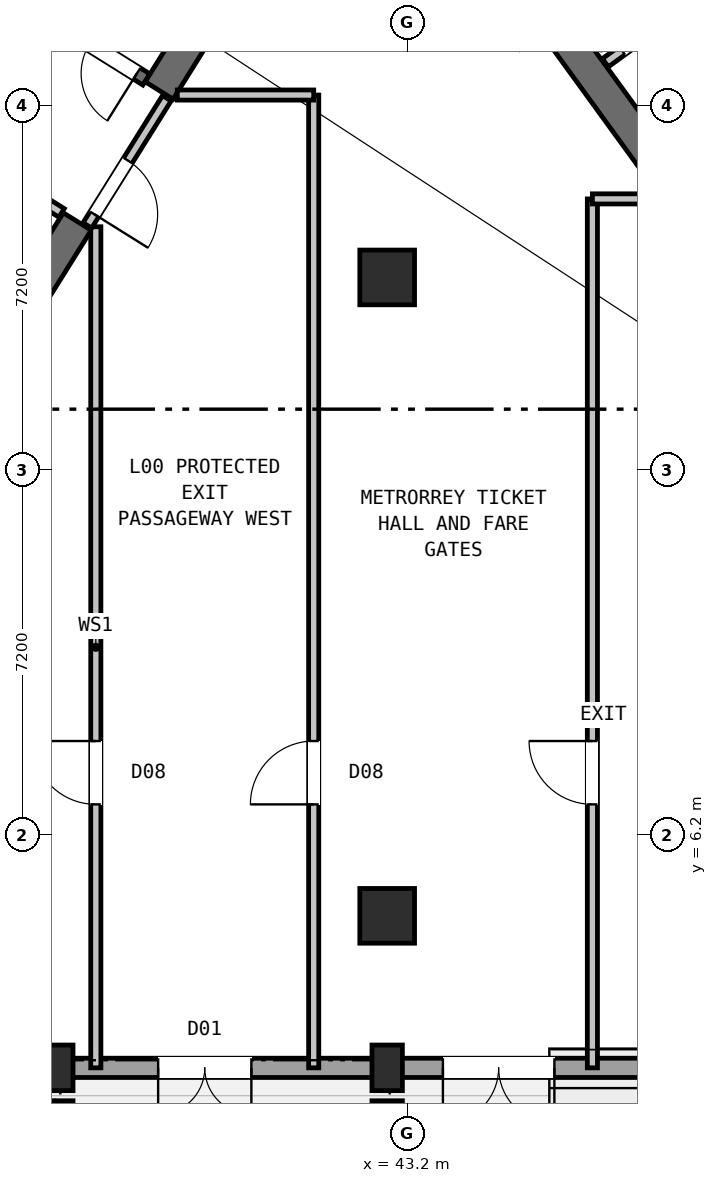
"""IFC4 building model, lengths in metres.
Left out: names, types, materials, properties, quantities, classifications, styles, units other than length and angle.
Written with IfcOpenShell. Run it as: python <this file> out.ifc"""

import sys

from ifc_helpers import new_model, si_unit, direction, frame, frame_2d, origin, origin_2d, place, context, subcontext, project, spatial, rectangle, hollow_rectangle, extrude, source, transform, mapped, element, fill, save


model = new_model("IFC4")
c1 = context("Model", 3, precision=1e-05, world=origin(), true_north=direction((0.0, 1.0)))
c2 = subcontext(c1, "Body", "Model", "MODEL_VIEW")
j1 = project(units=[si_unit("LENGTHUNIT", "METRE"), si_unit("PLANEANGLEUNIT", "RADIAN")], contexts=[c1])
p1 = place(None, origin())
s1 = spatial("IfcSite", under=j1, at=p1, CompositionType="ELEMENT")
p2 = place(p1, origin())
s2 = spatial("IfcBuilding", under=s1, at=p2, CompositionType="ELEMENT")
p3 = place(p2, origin())
s3 = spatial("IfcBuildingStorey", under=s2, at=p3, CompositionType="ELEMENT", Elevation=0.0)
p4 = place(p3, frame((40.168, 23.88, 0.0), z_axis=(0.0, 0.0, 1.0), x_axis=(-0.529893103397, -0.8480644427, 0.0)))
e1 = element("IfcWall", 1, at=p4, inside=s3, PredefinedType="SHEAR", context=c2, shape_type="SweptSolid", body=[
    extrude(rectangle(XDim=3.525, YDim=0.65, at=frame_2d((1.763, 0.0))), origin(), (0.0, 0.0, 1.0), 5.05),
])
p5 = place(p3, frame((36.683, 18.304, 0.0), z_axis=(0.0, 0.0, 1.0), x_axis=(-0.529899109053, -0.848060690178, 0.0)))
e2 = element("IfcWall", 2, at=p5, inside=s3, PredefinedType="SHEAR", context=c2, shape_type="SweptSolid", body=[
    extrude(rectangle(XDim=6.375, YDim=0.65, at=frame_2d((3.188, 0.0))), origin(), (0.0, 0.0, 1.0), 5.05),
])
p6 = place(p3, frame((48.526, 18.884, 0.0), z_axis=(0.0, 0.0, 1.0), x_axis=(-0.58777996584, 0.809020835181, 0.0)))
e3 = element("IfcWall", 3, at=p6, inside=s3, PredefinedType="SHEAR", context=c2, shape_type="SweptSolid", body=[
    extrude(rectangle(XDim=6.375, YDim=0.65, at=frame_2d((3.188, 0.0))), origin(), (0.0, 0.0, 1.0), 5.05),
])
m1 = source(origin(), c2, "Body", "SweptSolid", [
    extrude(hollow_rectangle(XDim=1.08, YDim=1.08, WallThickness=0.04, at=origin_2d()), origin(), (0.0, 0.0, 1.0), 5.4),
])
for number, where, z_axis, x_axis in (
    (4, (42.8, 4.6, 0.0), (0.0, 0.0, 1.0), (1.0, 0.0, 0.0)),
    (5, (42.8, 17.2, 0.0), (0.0, 0.0, 1.0), (1.0, 0.0, 0.0)),
):
    element("IfcColumn", number, at=place(p3, frame(where, z_axis=z_axis, x_axis=x_axis)), inside=s3, PredefinedType="COLUMN", context=c2, shape_type="MappedRepresentation", body=[
        mapped(m1, transform((0.0, 0.0, 0.0), scale=1.0)),
    ])
m2 = source(origin(), c2, "Body", "SweptSolid", [
    extrude(rectangle(XDim=0.6, YDim=0.9, at=origin_2d()), origin(), (0.0, 0.0, 1.0), 4.34),
])
p7 = place(p3, frame((36.3, 0.5, -0.16), z_axis=(0.0, 0.0, 1.0), x_axis=(1.0, 0.0, 0.0)))
e6 = element("IfcColumn", 6, at=p7, inside=s3, PredefinedType="PILASTER", context=c2, shape_type="MappedRepresentation", body=[
    mapped(m2, transform((0.0, 0.0, 0.0), scale=1.0)),
])
m3 = source(origin(), c2, "Body", "SweptSolid", [
    extrude(rectangle(XDim=0.6, YDim=0.9, at=origin_2d()), origin(), (0.0, 0.0, 1.0), 4.53),
])
p8 = place(p3, frame((36.3, 1.6, -0.35), z_axis=(0.0, 0.0, 1.0), x_axis=(1.0, 0.0, 0.0)))
e7 = element("IfcColumn", 7, at=p8, inside=s3, PredefinedType="PILASTER", context=c2, shape_type="MappedRepresentation", body=[
    mapped(m3, transform((0.0, 0.0, 0.0), scale=1.0)),
])
p9 = place(p3, frame((42.8, 0.5, -0.16), z_axis=(0.0, 0.0, 1.0), x_axis=(1.0, 0.0, 0.0)))
e8 = element("IfcColumn", 8, at=p9, inside=s3, PredefinedType="PILASTER", context=c2, shape_type="MappedRepresentation", body=[
    mapped(m2, transform((0.0, 0.0, 0.0), scale=1.0)),
])
p10 = place(p3, frame((42.8, 1.6, -0.35), z_axis=(0.0, 0.0, 1.0), x_axis=(1.0, 0.0, 0.0)))
e9 = element("IfcColumn", 9, at=p10, inside=s3, PredefinedType="PILASTER", context=c2, shape_type="MappedRepresentation", body=[
    mapped(m3, transform((0.0, 0.0, 0.0), scale=1.0)),
])
p11 = place(p3, frame((67.117, 1.6, 0.0), z_axis=(0.0, 0.0, 1.0), x_axis=(-1.0, 0.0, 0.0)))
e10 = element("IfcWall", 10, at=p11, inside=s3, PredefinedType="STANDARD", context=c2, shape_type="SweptSolid", body=[
    extrude(rectangle(XDim=62.234, YDim=0.38, at=frame_2d((31.117, 0.0))), origin(), (0.0, 0.0, 1.0), 3.755),
])
p12 = place(p11, frame((53.077, 0.0, 0.0)))
e11 = element("IfcOpeningElement", 11, at=p12, cuts=e10, PredefinedType="OPENING", context=c2, shape_type="SweptSolid", body=[
    extrude(rectangle(XDim=1.84, YDim=2.4, at=frame_2d((0.92, 1.2))), frame((0.0, 0.2, 0.0), z_axis=(0.0, -1.0, 0.0), x_axis=(1.0, 0.0, 0.0)), (0.0, 0.0, 1.0), 0.4),
])
p13 = place(p11, frame((39.517, 0.0, 0.0)))
e12 = element("IfcOpeningElement", 12, at=p13, cuts=e10, PredefinedType="OPENING", context=c2, shape_type="SweptSolid", body=[
    extrude(rectangle(XDim=2.2, YDim=2.6, at=frame_2d((1.1, 1.3))), frame((0.0, 0.2, 0.0), z_axis=(0.0, -1.0, 0.0), x_axis=(1.0, 0.0, 0.0)), (0.0, 0.0, 1.0), 0.4),
])
p14 = place(p11, frame((32.917, 0.0, 0.0)))
e13 = element("IfcOpeningElement", 13, at=p14, cuts=e10, PredefinedType="OPENING", context=c2, shape_type="SweptSolid", body=[
    extrude(rectangle(XDim=2.2, YDim=2.6, at=frame_2d((1.1, 1.3))), frame((0.0, 0.2, 0.0), z_axis=(0.0, -1.0, 0.0), x_axis=(1.0, 0.0, 0.0)), (0.0, 0.0, 1.0), 0.4),
])
p15 = place(p11, frame((26.997, 0.0, 0.0)))
e14 = element("IfcOpeningElement", 14, at=p15, cuts=e10, PredefinedType="OPENING", context=c2, shape_type="SweptSolid", body=[
    extrude(rectangle(XDim=1.84, YDim=2.4, at=frame_2d((0.92, 1.2))), frame((0.0, 0.2, 0.0), z_axis=(0.0, -1.0, 0.0), x_axis=(1.0, 0.0, 0.0)), (0.0, 0.0, 1.0), 0.4),
])
p16 = place(p11, frame((21.017, 0.0, 0.0)))
e15 = element("IfcOpeningElement", 15, at=p16, cuts=e10, PredefinedType="OPENING", context=c2, shape_type="SweptSolid", body=[
    extrude(rectangle(XDim=2.2, YDim=2.6, at=frame_2d((1.1, 1.3))), frame((0.0, 0.2, 0.0), z_axis=(0.0, -1.0, 0.0), x_axis=(1.0, 0.0, 0.0)), (0.0, 0.0, 1.0), 0.4),
])
p17 = place(p11, frame((17.297, 0.0, 0.0)))
e16 = element("IfcOpeningElement", 16, at=p17, cuts=e10, PredefinedType="OPENING", context=c2, shape_type="SweptSolid", body=[
    extrude(rectangle(XDim=1.84, YDim=2.4, at=frame_2d((0.92, 1.2))), frame((0.0, 0.2, 0.0), z_axis=(0.0, -1.0, 0.0), x_axis=(1.0, 0.0, 0.0)), (0.0, 0.0, 1.0), 0.4),
])
p18 = place(p11, frame((12.567, 0.0, 0.0)))
e17 = element("IfcOpeningElement", 17, at=p18, cuts=e10, PredefinedType="OPENING", context=c2, shape_type="SweptSolid", body=[
    extrude(rectangle(XDim=2.2, YDim=2.6, at=frame_2d((1.1, 1.3))), frame((0.0, 0.2, 0.0), z_axis=(0.0, -1.0, 0.0), x_axis=(1.0, 0.0, 0.0)), (0.0, 0.0, 1.0), 0.4),
])
p19 = place(p11, frame((6.277, 0.0, 0.0)))
e18 = element("IfcOpeningElement", 18, at=p19, cuts=e10, PredefinedType="OPENING", context=c2, shape_type="SweptSolid", body=[
    extrude(rectangle(XDim=1.84, YDim=2.4, at=frame_2d((0.92, 1.2))), frame((0.0, 0.2, 0.0), z_axis=(0.0, -1.0, 0.0), x_axis=(1.0, 0.0, 0.0)), (0.0, 0.0, 1.0), 0.4),
])
p20 = place(p3, frame((38.046, 21.108, 0.0), z_axis=(0.0, 0.0, 1.0), x_axis=(-0.848054434086, 0.529909121291, 0.0)))
e19 = element("IfcWall", 19, at=p20, inside=s3, PredefinedType="SHEAR", context=c2, shape_type="SweptSolid", body=[
    extrude(rectangle(XDim=7.33, YDim=0.26, at=frame_2d((3.665, 0.0))), origin(), (0.0, 0.0, 1.0), 5.05),
])
p21 = place(p20, frame((0.22, 0.0, 0.0)))
e20 = element("IfcOpeningElement", 20, at=p21, cuts=e19, PredefinedType="OPENING", context=c2, shape_type="SweptSolid", body=[
    extrude(rectangle(XDim=1.1, YDim=2.1, at=frame_2d((0.55, 1.05))), frame((0.0, 0.14, 0.0), z_axis=(0.0, -1.0, 0.0), x_axis=(1.0, 0.0, 0.0)), (0.0, 0.0, 1.0), 0.28),
])
p22 = place(p3, frame((36.374, 18.474, 0.0), z_axis=(0.0, 0.0, 1.0), x_axis=(-0.848051071577, 0.529914502535, 0.0)))
e21 = element("IfcWall", 21, at=p22, inside=s3, PredefinedType="STANDARD", context=c2, shape_type="SweptSolid", body=[
    extrude(rectangle(XDim=5.718, YDim=0.2, at=frame_2d((2.859, 0.0))), origin(), (0.0, 0.0, 1.0), 5.04),
])
p23 = place(p22, frame((2.498, 0.0, 0.0)))
e22 = element("IfcOpeningElement", 22, at=p23, cuts=e21, PredefinedType="OPENING", context=c2, shape_type="SweptSolid", body=[
    extrude(rectangle(XDim=1.15, YDim=2.1, at=frame_2d((0.575, 1.05))), frame((0.0, 0.11, 0.0), z_axis=(0.0, -1.0, 0.0), x_axis=(1.0, 0.0, 0.0)), (0.0, 0.0, 1.0), 0.22),
])
p24 = place(p3, frame((47.106, 21.437, 0.0), z_axis=(0.0, 0.0, 1.0), x_axis=(0.809012514015, 0.58779141893, 0.0)))
e23 = element("IfcWall", 23, at=p24, inside=s3, PredefinedType="STANDARD", context=c2, shape_type="SweptSolid", body=[
    extrude(rectangle(XDim=3.398, YDim=0.2, at=frame_2d((1.699, 0.0))), origin(), (0.0, 0.0, 1.0), 5.04),
])
p25 = place(p24, frame((0.408, 0.0, 0.0)))
e24 = element("IfcOpeningElement", 24, at=p25, cuts=e23, PredefinedType="OPENING", context=c2, shape_type="SweptSolid", body=[
    extrude(rectangle(XDim=1.3, YDim=2.2, at=frame_2d((0.65, 1.1))), frame((0.0, 0.11, 0.0), z_axis=(0.0, -1.0, 0.0), x_axis=(1.0, 0.0, 0.0)), (0.0, 0.0, 1.0), 0.22),
])
p26 = place(p3, frame((37.05, 1.6, 0.0), z_axis=(0.0, 0.0, 1.0), x_axis=(0.0, 1.0, 0.0)))
e25 = element("IfcWall", 25, at=p26, inside=s3, PredefinedType="STANDARD", context=c2, shape_type="SweptSolid", body=[
    extrude(rectangle(XDim=16.6, YDim=0.2, at=frame_2d((8.3, 0.0))), origin(), (0.0, 0.0, 1.0), 5.04),
])
p27 = place(p26, frame((5.2, 0.0, 0.0)))
e26 = element("IfcOpeningElement", 26, at=p27, cuts=e25, PredefinedType="OPENING", context=c2, shape_type="SweptSolid", body=[
    extrude(rectangle(XDim=1.25, YDim=2.15, at=frame_2d((0.625, 1.075))), frame((0.0, 0.11, 0.0), z_axis=(0.0, -1.0, 0.0), x_axis=(1.0, 0.0, 0.0)), (0.0, 0.0, 1.0), 0.22),
])
p28 = place(p3, frame((41.35, 1.6, 0.0), z_axis=(0.0, 0.0, 1.0), x_axis=(0.0, 1.0, 0.0)))
e27 = element("IfcWall", 27, at=p28, inside=s3, PredefinedType="STANDARD", context=c2, shape_type="SweptSolid", body=[
    extrude(rectangle(XDim=19.2, YDim=0.2, at=frame_2d((9.6, 0.0))), origin(), (0.0, 0.0, 1.0), 5.04),
])
p29 = place(p28, frame((5.2, 0.0, 0.0)))
e28 = element("IfcOpeningElement", 28, at=p29, cuts=e27, PredefinedType="OPENING", context=c2, shape_type="SweptSolid", body=[
    extrude(rectangle(XDim=1.25, YDim=2.15, at=frame_2d((0.625, 1.075))), frame((0.0, 0.11, 0.0), z_axis=(0.0, -1.0, 0.0), x_axis=(1.0, 0.0, 0.0)), (0.0, 0.0, 1.0), 0.22),
])
p30 = place(p3, frame((38.658, 20.8, 0.0), z_axis=(0.0, 0.0, 1.0), x_axis=(1.0, 0.0, 0.0)))
e29 = element("IfcWall", 29, at=p30, inside=s3, PredefinedType="STANDARD", context=c2, shape_type="SweptSolid", body=[
    extrude(rectangle(XDim=2.692, YDim=0.2, at=frame_2d((1.346, 0.0))), origin(), (0.0, 0.0, 1.0), 5.04),
])
p31 = place(p3, frame((46.85, 1.6, 0.0), z_axis=(0.0, 0.0, 1.0), x_axis=(0.0, 1.0, 0.0)))
e30 = element("IfcWall", 30, at=p31, inside=s3, PredefinedType="STANDARD", context=c2, shape_type="SweptSolid", body=[
    extrude(rectangle(XDim=17.15, YDim=0.2, at=frame_2d((8.575, 0.0))), origin(), (0.0, 0.0, 1.0), 5.04),
])
p32 = place(p31, frame((5.2, 0.0, 0.0)))
e31 = element("IfcOpeningElement", 31, at=p32, cuts=e30, PredefinedType="OPENING", context=c2, shape_type="SweptSolid", body=[
    extrude(rectangle(XDim=1.25, YDim=2.15, at=frame_2d((0.625, 1.075))), frame((0.0, 0.11, 0.0), z_axis=(0.0, -1.0, 0.0), x_axis=(1.0, 0.0, 0.0)), (0.0, 0.0, 1.0), 0.22),
])
p33 = place(p3, frame((46.85, 18.75, 0.0), z_axis=(0.0, 0.0, 1.0), x_axis=(1.0, 0.0, 0.0)))
e32 = element("IfcWall", 32, at=p33, inside=s3, PredefinedType="STANDARD", context=c2, shape_type="SweptSolid", body=[
    extrude(rectangle(XDim=1.338, YDim=0.2, at=frame_2d((0.669, 0.0))), origin(), (0.0, 0.0, 1.0), 5.04),
])
p34 = place(p3, frame((38.451, 20.737, 0.0), z_axis=(0.0, 0.0, 1.0), x_axis=(-0.529924799939, -0.848044637038, 0.0)))
e33 = element("IfcWall", 33, at=p34, inside=s3, PredefinedType="STANDARD", context=c2, shape_type="SweptSolid", body=[
    extrude(rectangle(XDim=2.96, YDim=0.2, at=frame_2d((1.48, 0.0))), origin(), (0.0, 0.0, 1.0), 5.04),
])
p35 = place(p34, frame((1.45, 0.0, 0.0)))
e34 = element("IfcOpeningElement", 34, at=p35, cuts=e33, PredefinedType="OPENING", context=c2, shape_type="SweptSolid", body=[
    extrude(rectangle(XDim=1.25, YDim=2.15, at=frame_2d((0.625, 1.075))), frame((0.0, 0.11, 0.0), z_axis=(0.0, -1.0, 0.0), x_axis=(1.0, 0.0, 0.0)), (0.0, 0.0, 1.0), 0.22),
])
m4 = source(origin(), c2, "Body", "SweptSolid", [
    extrude(rectangle(XDim=1.84, YDim=2.4, at=frame_2d((0.92, 1.2))), frame((0.0, 0.025, 0.0), z_axis=(0.0, -1.0, 0.0), x_axis=(1.0, 0.0, 0.0)), (0.0, 0.0, 1.0), 0.05),
])
p36 = place(p15, origin())
e35 = element("IfcDoor", 35, at=p36, inside=s3, OperationType="DOUBLE_DOOR_SINGLE_SWING", PredefinedType="DOOR", context=c2, shape_type="MappedRepresentation", body=[
    mapped(m4, transform((0.0, 0.0, 0.0), scale=1.0)),
])
fill(e14, e35)
m5 = source(origin(), c2, "Body", "SweptSolid", [
    extrude(rectangle(XDim=2.2, YDim=2.6, at=frame_2d((1.1, 1.3))), frame((0.0, 0.025, 0.0), z_axis=(0.0, -1.0, 0.0), x_axis=(1.0, 0.0, 0.0)), (0.0, 0.0, 1.0), 0.05),
])
p37 = place(p16, origin())
e36 = element("IfcDoor", 36, at=p37, inside=s3, OperationType="DOUBLE_DOOR_SINGLE_SWING", PredefinedType="DOOR", context=c2, shape_type="MappedRepresentation", body=[
    mapped(m5, transform((0.0, 0.0, 0.0), scale=1.0)),
])
fill(e15, e36)
m6 = source(origin(), c2, "Body", "SweptSolid", [
    extrude(rectangle(XDim=1.1, YDim=2.1, at=frame_2d((0.55, 1.05))), frame((0.0, 0.025, 0.0), z_axis=(0.0, -1.0, 0.0), x_axis=(1.0, 0.0, 0.0)), (0.0, 0.0, 1.0), 0.05),
])
p38 = place(p21, origin())
e37 = element("IfcDoor", 37, at=p38, inside=s3, OperationType="SINGLE_SWING_LEFT", PredefinedType="DOOR", context=c2, shape_type="MappedRepresentation", body=[
    mapped(m6, transform((0.0, 0.0, 0.0), scale=1.0)),
])
fill(e20, e37)
m7 = source(origin(), c2, "Body", "SweptSolid", [
    extrude(rectangle(XDim=1.25, YDim=2.15, at=frame_2d((0.625, 1.075))), frame((0.0, 0.025, 0.0), z_axis=(0.0, -1.0, 0.0), x_axis=(1.0, 0.0, 0.0)), (0.0, 0.0, 1.0), 0.05),
])
p39 = place(p27, origin())
e38 = element("IfcDoor", 38, at=p39, inside=s3, OperationType="SINGLE_SWING_RIGHT", PredefinedType="DOOR", context=c2, shape_type="MappedRepresentation", body=[
    mapped(m7, transform((0.0, 0.0, 0.0), scale=1.0)),
])
fill(e26, e38)
p40 = place(p29, origin())
e39 = element("IfcDoor", 39, at=p40, inside=s3, OperationType="SINGLE_SWING_LEFT", PredefinedType="DOOR", context=c2, shape_type="MappedRepresentation", body=[
    mapped(m7, transform((0.0, 0.0, 0.0), scale=1.0)),
])
fill(e28, e39)
p41 = place(p32, origin())
e40 = element("IfcDoor", 40, at=p41, inside=s3, OperationType="SINGLE_SWING_RIGHT", PredefinedType="DOOR", context=c2, shape_type="MappedRepresentation", body=[
    mapped(m7, transform((0.0, 0.0, 0.0), scale=1.0)),
])
fill(e31, e40)
p42 = place(p35, origin())
e41 = element("IfcDoor", 41, at=p42, inside=s3, OperationType="SINGLE_SWING_RIGHT", PredefinedType="DOOR", context=c2, shape_type="MappedRepresentation", body=[
    mapped(m7, transform((0.0, 0.0, 0.0), scale=1.0)),
])
fill(e34, e41)
save(model, sys.argv[1])
